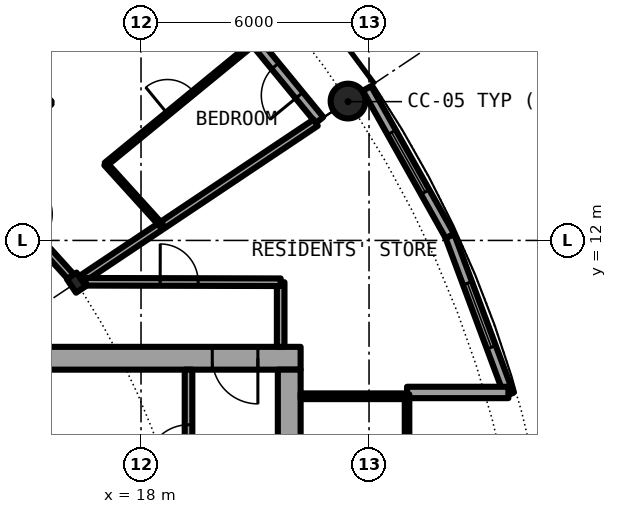
"""IFC4 building model, lengths in metres.
Left out: names, types, materials, properties, quantities, classifications, styles, units other than length and angle.
Written with IfcOpenShell. Run it as: python <this file> out.ifc"""

import sys

from ifc_helpers import new_model, si_unit, direction, frame, frame_2d, origin, origin_2d, place, context, subcontext, project, spatial, rectangle, hollow_circle, i_section, extrude, element, fill, save


model = new_model("IFC4")
c1 = context("Model", 3, precision=1e-05, world=origin(), true_north=direction((0.0, 1.0)))
c2 = subcontext(c1, "Body", "Model", "MODEL_VIEW")
j1 = project(units=[si_unit("LENGTHUNIT", "METRE"), si_unit("PLANEANGLEUNIT", "RADIAN")], contexts=[c1])
p1 = place(None, origin())
s1 = spatial("IfcSite", under=j1, at=p1, CompositionType="ELEMENT")
p2 = place(p1, origin())
s2 = spatial("IfcBuilding", under=s1, at=p2, CompositionType="ELEMENT")
p3 = place(p2, frame((0.0, 0.0, 123.85)))
s3 = spatial("IfcBuildingStorey", under=s2, at=p3, CompositionType="ELEMENT", Elevation=123.85)
p4 = place(p3, frame((23.448, 15.667, 0.0), z_axis=(0.0, 0.0, 1.0), x_axis=(1.0, 0.0, 0.0)))
e1 = element("IfcColumn", 1, at=p4, inside=s3, PredefinedType="COLUMN", context=c2, shape_type="SweptSolid", body=[
    extrude(hollow_circle(Radius=0.457, WallThickness=0.04, at=origin_2d()), origin(), (0.0, 0.0, 1.0), 3.05),
])
p5 = place(p3, frame((16.297, 10.889, 0.0), z_axis=(0.0, 0.0, 1.0), x_axis=(0.831469612303, 0.55557023302, 0.0)))
e2 = element("IfcColumn", 2, at=p5, inside=s3, PredefinedType="COLUMN", context=c2, shape_type="SweptSolid", body=[
    extrude(i_section(OverallWidth=0.307, OverallDepth=0.432, WebThickness=0.021, FlangeThickness=0.04, FilletRadius=0.027, at=origin_2d()), origin(), (0.0, 0.0, 1.0), 3.05),
])
p6 = place(p3, frame((22.699, 15.167, 0.0), z_axis=(0.0, 0.0, 1.0), x_axis=(-0.634382322723, 0.773019449054, 0.0)))
e3 = element("IfcWall", 3, at=p6, inside=s3, PredefinedType="SOLIDWALL", context=c2, shape_type="SweptSolid", body=[
    extrude(rectangle(XDim=5.352, YDim=0.25, at=frame_2d((2.676, 0.0))), origin(), (0.0, 0.0, 1.0), 2.7),
])
p7 = place(p6, frame((0.841, 0.0, 0.0)))
e4 = element("IfcOpeningElement", 4, at=p7, cuts=e3, PredefinedType="OPENING", context=c2, shape_type="SweptSolid", body=[
    extrude(rectangle(XDim=1.0, YDim=2.2, at=frame_2d((0.5, 1.1))), frame((0.0, 0.135, 0.0), z_axis=(0.0, -1.0, 0.0), x_axis=(1.0, 0.0, 0.0)), (0.0, 0.0, 1.0), 0.27),
])
p8 = place(p6, frame((3.111, 0.0, 0.3)))
e5 = element("IfcOpeningElement", 5, at=p8, cuts=e3, PredefinedType="OPENING", context=c2, shape_type="SweptSolid", body=[
    extrude(rectangle(XDim=1.8, YDim=2.1, at=frame_2d((0.9, 1.05))), frame((0.0, 0.135, 0.0), z_axis=(0.0, -1.0, 0.0), x_axis=(1.0, 0.0, 0.0)), (0.0, 0.0, 1.0), 0.27),
])
p9 = place(p3, frame((27.682, 7.945, 0.0), z_axis=(0.0, 0.0, 1.0), x_axis=(-0.349247811493, 0.937030397675, 0.0)))
e6 = element("IfcWall", 6, at=p9, inside=s3, PredefinedType="SOLIDWALL", context=c2, shape_type="SweptSolid", body=[
    extrude(rectangle(XDim=4.452, YDim=0.25, at=frame_2d((2.226, 0.0))), origin(), (0.0, 0.0, 1.0), 2.7),
])
p10 = place(p9, frame((1.327, 0.0, 0.3)))
e7 = element("IfcOpeningElement", 7, at=p10, cuts=e6, PredefinedType="OPENING", context=c2, shape_type="SweptSolid", body=[
    extrude(rectangle(XDim=1.8, YDim=2.1, at=frame_2d((0.9, 1.05))), frame((0.0, 0.135, 0.0), z_axis=(0.0, -1.0, 0.0), x_axis=(1.0, 0.0, 0.0)), (0.0, 0.0, 1.0), 0.27),
])
p11 = place(p3, frame((26.127, 12.117, 0.0), z_axis=(0.0, 0.0, 1.0), x_axis=(-0.489696356642, 0.871893042919, 0.0)))
e8 = element("IfcWall", 8, at=p11, inside=s3, PredefinedType="SOLIDWALL", context=c2, shape_type="SweptSolid", body=[
    extrude(rectangle(XDim=4.454, YDim=0.25, at=frame_2d((2.227, 0.0))), origin(), (0.0, 0.0, 1.0), 2.7),
])
p12 = place(p11, frame((1.327, 0.0, 0.3)))
e9 = element("IfcOpeningElement", 9, at=p12, cuts=e8, PredefinedType="OPENING", context=c2, shape_type="SweptSolid", body=[
    extrude(rectangle(XDim=1.8, YDim=2.1, at=frame_2d((0.9, 1.05))), frame((0.0, 0.135, 0.0), z_axis=(0.0, -1.0, 0.0), x_axis=(1.0, 0.0, 0.0)), (0.0, 0.0, 1.0), 0.27),
])
p13 = place(p3, frame((25.0, 8.0, 0.0), z_axis=(0.0, 0.0, 1.0), x_axis=(1.0, 0.0, 0.0)))
e10 = element("IfcWall", 10, at=p13, inside=s3, PredefinedType="SOLIDWALL", context=c2, shape_type="SweptSolid", body=[
    extrude(rectangle(XDim=2.667, YDim=0.3, at=frame_2d((1.333, 0.0))), origin(), (0.0, 0.0, 1.0), 2.7),
])
p14 = place(p3, frame((22.2, 8.9, 0.0), z_axis=(0.0, 0.0, 1.0), x_axis=(-1.0, 0.0, 0.0)))
e11 = element("IfcWall", 11, at=p14, inside=s3, PredefinedType="SHEAR", context=c2, shape_type="SweptSolid", body=[
    extrude(rectangle(XDim=13.8, YDim=0.6, at=frame_2d((6.9, 0.0))), origin(), (0.0, 0.0, 1.0), 3.05),
])
p15 = place(p14, frame((1.125, 0.0, 0.0)))
e12 = element("IfcOpeningElement", 12, at=p15, cuts=e11, PredefinedType="OPENING", context=c2, shape_type="SweptSolid", body=[
    extrude(rectangle(XDim=1.2, YDim=2.3, at=frame_2d((0.6, 1.15))), frame((0.0, 0.31, 0.0), z_axis=(0.0, -1.0, 0.0), x_axis=(1.0, 0.0, 0.0)), (0.0, 0.0, 1.0), 0.62),
])
p16 = place(p3, frame((21.9, 8.6, 0.0), z_axis=(0.0, 0.0, 1.0), x_axis=(0.0, -1.0, 0.0)))
e13 = element("IfcWall", 13, at=p16, inside=s3, PredefinedType="SHEAR", context=c2, shape_type="SweptSolid", body=[
    extrude(rectangle(XDim=17.2, YDim=0.6, at=frame_2d((8.6, 0.0))), origin(), (0.0, 0.0, 1.0), 3.05),
])
p17 = place(p16, frame((7.7, 0.0, 0.0)))
e14 = element("IfcOpeningElement", 14, at=p17, cuts=e13, PredefinedType="OPENING", context=c2, shape_type="SweptSolid", body=[
    extrude(rectangle(XDim=1.8, YDim=2.3, at=frame_2d((0.9, 1.15))), frame((0.0, 0.31, 0.0), z_axis=(0.0, -1.0, 0.0), x_axis=(1.0, 0.0, 0.0)), (0.0, 0.0, 1.0), 0.62),
])
p18 = place(p3, frame((19.25, 1.575, 0.0), z_axis=(0.0, 0.0, 1.0), x_axis=(0.0, 1.0, 0.0)))
e15 = element("IfcWall", 15, at=p18, inside=s3, PredefinedType="SOLIDWALL", context=c2, shape_type="SweptSolid", body=[
    extrude(rectangle(XDim=7.025, YDim=0.2, at=frame_2d((3.513, 0.0))), origin(), (0.0, 0.0, 1.0), 2.7),
])
p19 = place(p18, frame((4.475, 0.0, 0.0)))
e16 = element("IfcOpeningElement", 16, at=p19, cuts=e15, PredefinedType="OPENING", context=c2, shape_type="SweptSolid", body=[
    extrude(rectangle(XDim=1.1, YDim=2.3, at=frame_2d((0.55, 1.15))), frame((0.0, 0.11, 0.0), z_axis=(0.0, -1.0, 0.0), x_axis=(1.0, 0.0, 0.0)), (0.0, 0.0, 1.0), 0.22),
])
p20 = place(p3, frame((22.2, 7.9, 0.0), z_axis=(0.0, 0.0, 1.0), x_axis=(1.0, 0.0, 0.0)))
e17 = element("IfcWall", 17, at=p20, inside=s3, PredefinedType="PARTITIONING", context=c2, shape_type="SweptSolid", body=[
    extrude(rectangle(XDim=2.74, YDim=0.15, at=frame_2d((1.37, 0.0))), origin(), (0.0, 0.0, 1.0), 2.7),
])
p21 = place(p3, frame((25.0, -7.95, 0.0), z_axis=(0.0, 0.0, 1.0), x_axis=(0.0, 1.0, 0.0)))
e18 = element("IfcWall", 18, at=p21, inside=s3, PredefinedType="PARTITIONING", context=c2, shape_type="SweptSolid", body=[
    extrude(rectangle(XDim=15.9, YDim=0.12, at=frame_2d((7.95, 0.0))), origin(), (0.0, 0.0, 1.0), 2.7),
])
p22 = place(p21, frame((0.95, 0.0, 0.1)))
e19 = element("IfcOpeningElement", 19, at=p22, cuts=e18, PredefinedType="OPENING", context=c2, shape_type="SweptSolid", body=[
    extrude(rectangle(XDim=14.0, YDim=2.35, at=frame_2d((7.0, 1.175))), frame((0.0, 0.07, 0.0), z_axis=(0.0, -1.0, 0.0), x_axis=(1.0, 0.0, 0.0)), (0.0, 0.0, 1.0), 0.14),
])
p23 = place(p3, frame((21.675, 9.2, 0.0), z_axis=(0.0, 0.0, 1.0), x_axis=(0.0, 1.0, 0.0)))
e20 = element("IfcWall", 20, at=p23, inside=s3, PredefinedType="PARTITIONING", context=c2, shape_type="SweptSolid", body=[
    extrude(rectangle(XDim=1.7, YDim=0.2, at=frame_2d((0.85, 0.0))), origin(), (0.0, 0.0, 1.0), 2.7),
])
p24 = place(p3, frame((12.434, 15.151, 0.0), z_axis=(0.0, 0.0, 1.0), x_axis=(0.634381303318, 0.773020285633, 0.0)))
e21 = element("IfcWall", 21, at=p24, inside=s3, PredefinedType="PARTITIONING", context=c2, shape_type="SweptSolid", body=[
    extrude(rectangle(XDim=7.576, YDim=0.2, at=frame_2d((3.788, 0.0))), origin(), (0.0, 0.0, 1.0), 2.7),
])
p25 = place(p3, frame((16.477, 11.009, 0.0), z_axis=(0.0, 0.0, 1.0), x_axis=(0.831406593008, 0.555664536482, 0.0)))
e22 = element("IfcWall", 22, at=p25, inside=s3, PredefinedType="PARTITIONING", context=c2, shape_type="SweptSolid", body=[
    extrude(rectangle(XDim=7.358, YDim=0.2, at=frame_2d((3.679, 0.0))), origin(), (0.0, 0.0, 1.0), 2.7),
])
p26 = place(p3, frame((17.077, 14.006, 0.0), z_axis=(0.0, 0.0, 1.0), x_axis=(0.77326214499, 0.634086472908, 0.0)))
e23 = element("IfcWall", 23, at=p26, inside=s3, PredefinedType="PARTITIONING", context=c2, shape_type="SweptSolid", body=[
    extrude(rectangle(XDim=5.089, YDim=0.1, at=frame_2d((2.544, 0.0))), origin(), (0.0, 0.0, 1.0), 2.7),
])
p27 = place(p26, frame((2.094, 0.0, 0.0)))
e24 = element("IfcOpeningElement", 24, at=p27, cuts=e23, PredefinedType="OPENING", context=c2, shape_type="SweptSolid", body=[
    extrude(rectangle(XDim=0.9, YDim=2.3, at=frame_2d((0.45, 1.15))), frame((0.0, 0.06, 0.0), z_axis=(0.0, -1.0, 0.0), x_axis=(1.0, 0.0, 0.0)), (0.0, 0.0, 1.0), 0.12),
])
p28 = place(p3, frame((16.541, 10.912, 0.0), z_axis=(0.0, 0.0, 1.0), x_axis=(0.999997173357, -0.002377662213, 0.0)))
e25 = element("IfcWall", 25, at=p28, inside=s3, PredefinedType="PARTITIONING", context=c2, shape_type="SweptSolid", body=[
    extrude(rectangle(XDim=5.134, YDim=0.2, at=frame_2d((2.567, 0.0))), origin(), (0.0, 0.0, 1.0), 2.7),
])
p29 = place(p28, frame((1.963, 0.0, 0.0)))
e26 = element("IfcOpeningElement", 26, at=p29, cuts=e25, PredefinedType="OPENING", context=c2, shape_type="SweptSolid", body=[
    extrude(rectangle(XDim=1.0, YDim=2.3, at=frame_2d((0.5, 1.15))), frame((0.0, 0.11, 0.0), z_axis=(0.0, -1.0, 0.0), x_axis=(1.0, 0.0, 0.0)), (0.0, 0.0, 1.0), 0.22),
])
p30 = place(p3, frame((12.434, 15.151, 0.0), z_axis=(0.0, 0.0, 1.0), x_axis=(0.671481997275, -0.741020868354, 0.0)))
e27 = element("IfcWall", 27, at=p30, inside=s3, PredefinedType="PARTITIONING", context=c2, shape_type="SweptSolid", body=[
    extrude(rectangle(XDim=5.596, YDim=0.2, at=frame_2d((2.798, 0.0))), origin(), (0.0, 0.0, 1.0), 2.39),
])
p31 = place(p30, frame((3.319, 0.0, 0.0)))
e28 = element("IfcOpeningElement", 28, at=p31, cuts=e27, PredefinedType="OPENING", context=c2, shape_type="SweptSolid", body=[
    extrude(rectangle(XDim=1.0, YDim=2.3, at=frame_2d((0.5, 1.15))), frame((0.0, 0.11, 0.0), z_axis=(0.0, -1.0, 0.0), x_axis=(1.0, 0.0, 0.0)), (0.0, 0.0, 1.0), 0.22),
])
p32 = place(p3, frame((17.072, 14.011, 0.0), z_axis=(0.0, 0.0, 1.0), x_axis=(0.67169789574, -0.740825172937, 0.0)))
e29 = element("IfcWall", 29, at=p32, inside=s3, PredefinedType="PARTITIONING", context=c2, shape_type="SweptSolid", body=[
    extrude(rectangle(XDim=2.183, YDim=0.1, at=frame_2d((1.091, 0.0))), origin(), (0.0, 0.0, 1.0), 2.7),
])
p33 = place(p7, origin())
e30 = element("IfcDoor", 30, at=p33, inside=s3, OperationType="SINGLE_SWING_LEFT", PredefinedType="DOOR", context=c2, shape_type="SweptSolid", body=[
    extrude(rectangle(XDim=1.0, YDim=2.2, at=frame_2d((0.5, 1.1))), frame((0.0, 0.025, 0.0), z_axis=(0.0, -1.0, 0.0), x_axis=(1.0, 0.0, 0.0)), (0.0, 0.0, 1.0), 0.05),
])
fill(e4, e30)
p34 = place(p10, origin())
e31 = element("IfcWindow", 31, at=p34, inside=s3, PartitioningType="SINGLE_PANEL", PredefinedType="WINDOW", context=c2, shape_type="SweptSolid", body=[
    extrude(rectangle(XDim=1.8, YDim=2.1, at=frame_2d((0.9, 1.05))), frame((0.0, 0.03, 0.0), z_axis=(0.0, -1.0, 0.0), x_axis=(1.0, 0.0, 0.0)), (0.0, 0.0, 1.0), 0.06),
])
fill(e7, e31)
p35 = place(p12, origin())
e32 = element("IfcWindow", 32, at=p35, inside=s3, PartitioningType="SINGLE_PANEL", PredefinedType="WINDOW", context=c2, shape_type="SweptSolid", body=[
    extrude(rectangle(XDim=1.8, YDim=2.1, at=frame_2d((0.9, 1.05))), frame((0.0, 0.03, 0.0), z_axis=(0.0, -1.0, 0.0), x_axis=(1.0, 0.0, 0.0)), (0.0, 0.0, 1.0), 0.06),
])
fill(e9, e32)
p36 = place(p19, origin())
e33 = element("IfcDoor", 33, at=p36, inside=s3, OperationType="SINGLE_SWING_LEFT", PredefinedType="DOOR", context=c2, shape_type="SweptSolid", body=[
    extrude(rectangle(XDim=1.1, YDim=2.3, at=frame_2d((0.55, 1.15))), frame((0.0, 0.025, 0.0), z_axis=(0.0, -1.0, 0.0), x_axis=(1.0, 0.0, 0.0)), (0.0, 0.0, 1.0), 0.05),
])
fill(e16, e33)
p37 = place(p15, origin())
e34 = element("IfcDoor", 34, at=p37, inside=s3, OperationType="SINGLE_SWING_RIGHT", PredefinedType="DOOR", context=c2, shape_type="SweptSolid", body=[
    extrude(rectangle(XDim=1.2, YDim=2.3, at=frame_2d((0.6, 1.15))), frame((0.0, 0.025, 0.0), z_axis=(0.0, -1.0, 0.0), x_axis=(1.0, 0.0, 0.0)), (0.0, 0.0, 1.0), 0.05),
])
fill(e12, e34)
p38 = place(p22, origin())
e35 = element("IfcWindow", 35, at=p38, inside=s3, PartitioningType="SINGLE_PANEL", PredefinedType="WINDOW", context=c2, shape_type="SweptSolid", body=[
    extrude(rectangle(XDim=14.0, YDim=2.35, at=frame_2d((7.0, 1.175))), frame((0.0, 0.03, 0.0), z_axis=(0.0, -1.0, 0.0), x_axis=(1.0, 0.0, 0.0)), (0.0, 0.0, 1.0), 0.06),
])
fill(e19, e35)
p39 = place(p27, origin())
e36 = element("IfcDoor", 36, at=p39, inside=s3, OperationType="SINGLE_SWING_RIGHT", PredefinedType="DOOR", context=c2, shape_type="SweptSolid", body=[
    extrude(rectangle(XDim=0.9, YDim=2.3, at=frame_2d((0.45, 1.15))), frame((0.0, 0.025, 0.0), z_axis=(0.0, -1.0, 0.0), x_axis=(1.0, 0.0, 0.0)), (0.0, 0.0, 1.0), 0.05),
])
fill(e24, e36)
p40 = place(p29, origin())
e37 = element("IfcDoor", 37, at=p40, inside=s3, OperationType="SINGLE_SWING_LEFT", PredefinedType="DOOR", context=c2, shape_type="SweptSolid", body=[
    extrude(rectangle(XDim=1.0, YDim=2.3, at=frame_2d((0.5, 1.15))), frame((0.0, 0.025, 0.0), z_axis=(0.0, -1.0, 0.0), x_axis=(1.0, 0.0, 0.0)), (0.0, 0.0, 1.0), 0.05),
])
fill(e26, e37)
save(model, sys.argv[1])
